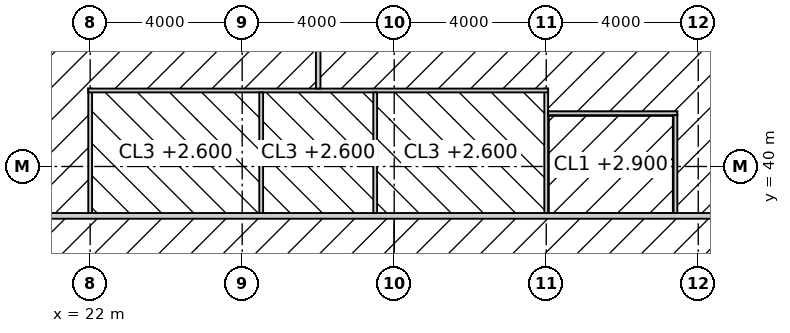
"""IFC4 building model, lengths in metres.
Left out: names, types, materials, properties, quantities, classifications, styles, units other than length and angle.
Written with IfcOpenShell. Run it as: python <this file> out.ifc"""

import sys

from ifc_helpers import new_model, si_unit, direction, frame, frame_2d, origin, place, context, subcontext, project, spatial, rectangle, extrude, element, fill, save


model = new_model("IFC4")
c1 = context("Model", 3, precision=1e-05, world=origin(), true_north=direction((0.0, 1.0)))
c2 = subcontext(c1, "Body", "Model", "MODEL_VIEW")
j1 = project(units=[si_unit("LENGTHUNIT", "METRE"), si_unit("PLANEANGLEUNIT", "RADIAN")], contexts=[c1])
p1 = place(None, origin())
s1 = spatial("IfcSite", under=j1, at=p1, CompositionType="ELEMENT")
p2 = place(p1, origin())
s2 = spatial("IfcBuilding", under=s1, at=p2, CompositionType="ELEMENT")
p3 = place(p2, frame((0.0, 0.0, 19.0)))
s3 = spatial("IfcBuildingStorey", under=s2, at=p3, CompositionType="ELEMENT", Elevation=19.0)
p4 = place(p3, frame((15.775, 38.7, 0.0), z_axis=(0.0, 0.0, 1.0), x_axis=(1.0, 0.0, 0.0)))
e1 = element("IfcWall", 1, at=p4, inside=s3, PredefinedType="PARTITIONING", context=c2, shape_type="SweptSolid", body=[
    extrude(rectangle(XDim=28.45, YDim=0.15, at=frame_2d((14.225, 0.0))), origin(), (0.0, 0.0, 1.0), 3.85),
])
p5 = place(p4, frame((7.975, 0.0, 0.0)))
e2 = element("IfcOpeningElement", 2, at=p5, cuts=e1, PredefinedType="OPENING", context=c2, shape_type="SweptSolid", body=[
    extrude(rectangle(XDim=0.9, YDim=2.1, at=frame_2d((0.45, 1.05))), frame((0.0, 0.085, 0.0), z_axis=(0.0, -1.0, 0.0), x_axis=(1.0, 0.0, 0.0)), (0.0, 0.0, 1.0), 0.17),
])
p6 = place(p4, frame((11.725, 0.0, 0.0)))
e3 = element("IfcOpeningElement", 3, at=p6, cuts=e1, PredefinedType="OPENING", context=c2, shape_type="SweptSolid", body=[
    extrude(rectangle(XDim=1.0, YDim=2.1, at=frame_2d((0.5, 1.05))), frame((0.0, 0.085, 0.0), z_axis=(0.0, -1.0, 0.0), x_axis=(1.0, 0.0, 0.0)), (0.0, 0.0, 1.0), 0.17),
])
p7 = place(p4, frame((15.575, 0.0, 0.0)))
e4 = element("IfcOpeningElement", 4, at=p7, cuts=e1, PredefinedType="OPENING", context=c2, shape_type="SweptSolid", body=[
    extrude(rectangle(XDim=0.9, YDim=2.1, at=frame_2d((0.45, 1.05))), frame((0.0, 0.085, 0.0), z_axis=(0.0, -1.0, 0.0), x_axis=(1.0, 0.0, 0.0)), (0.0, 0.0, 1.0), 0.17),
])
for number, where, z_axis, x_axis in (
    (5, (22.0, 38.775, 0.0), (0.0, 0.0, 1.0), (0.0, 1.0, 0.0)),
    (6, (34.0, 38.775, 0.0), (0.0, 0.0, 1.0), (0.0, 1.0, 0.0)),
):
    element("IfcWall", number, at=place(p3, frame(where, z_axis=z_axis, x_axis=x_axis)), inside=s3, PredefinedType="PARTITIONING", context=c2, shape_type="SweptSolid", body=[
        extrude(rectangle(XDim=3.275, YDim=0.1, at=frame_2d((1.638, 0.0))), origin(), (0.0, 0.0, 1.0), 2.95),
    ])
p8 = place(p3, frame((21.95, 42.0, 0.0), z_axis=(0.0, 0.0, 1.0), x_axis=(1.0, 0.0, 0.0)))
e7 = element("IfcWall", 7, at=p8, inside=s3, PredefinedType="PARTITIONING", context=c2, shape_type="SweptSolid", body=[
    extrude(rectangle(XDim=12.1, YDim=0.1, at=frame_2d((6.05, 0.0))), origin(), (0.0, 0.0, 1.0), 3.85),
])
for number, where, z_axis, x_axis in (
    (8, (26.5, 38.775, 0.0), (0.0, 0.0, 1.0), (0.0, 1.0, 0.0)),
    (9, (29.5, 38.775, 0.0), (0.0, 0.0, 1.0), (0.0, 1.0, 0.0)),
):
    element("IfcWall", number, at=place(p3, frame(where, z_axis=z_axis, x_axis=x_axis)), inside=s3, PredefinedType="PARTITIONING", context=c2, shape_type="SweptSolid", body=[
        extrude(rectangle(XDim=3.175, YDim=0.1, at=frame_2d((1.587, 0.0))), origin(), (0.0, 0.0, 1.0), 3.85),
    ])
p9 = place(p3, frame((28.0, 42.05, 0.0), z_axis=(0.0, 0.0, 1.0), x_axis=(0.0, 1.0, 0.0)))
e10 = element("IfcWall", 10, at=p9, inside=s3, PredefinedType="PARTITIONING", context=c2, shape_type="SweptSolid", body=[
    extrude(rectangle(XDim=1.65, YDim=0.12, at=frame_2d((0.825, 0.0))), origin(), (0.0, 0.0, 1.0), 3.85),
])
p10 = place(p3, frame((34.05, 41.4, 0.0), z_axis=(0.0, 0.0, 1.0), x_axis=(1.0, 0.0, 0.0)))
e11 = element("IfcWall", 11, at=p10, inside=s3, PredefinedType="PARTITIONING", context=c2, shape_type="SweptSolid", body=[
    extrude(rectangle(XDim=3.4, YDim=0.1, at=frame_2d((1.7, 0.0))), origin(), (0.0, 0.0, 1.0), 3.85),
])
p11 = place(p10, frame((1.15, 0.0, 0.0)))
e12 = element("IfcOpeningElement", 12, at=p11, cuts=e11, PredefinedType="OPENING", context=c2, shape_type="SweptSolid", body=[
    extrude(rectangle(XDim=1.0, YDim=2.2, at=frame_2d((0.5, 1.1))), frame((0.0, 0.06, 0.0), z_axis=(0.0, -1.0, 0.0), x_axis=(1.0, 0.0, 0.0)), (0.0, 0.0, 1.0), 0.12),
])
p12 = place(p3, frame((37.4, 38.775, 0.0), z_axis=(0.0, 0.0, 1.0), x_axis=(0.0, 1.0, 0.0)))
e13 = element("IfcWall", 13, at=p12, inside=s3, PredefinedType="PARTITIONING", context=c2, shape_type="SweptSolid", body=[
    extrude(rectangle(XDim=2.575, YDim=0.1, at=frame_2d((1.288, 0.0))), origin(), (0.0, 0.0, 1.0), 3.85),
])
p13 = place(p5, origin())
e14 = element("IfcDoor", 14, at=p13, inside=s3, OperationType="SINGLE_SWING_LEFT", PredefinedType="DOOR", context=c2, shape_type="SweptSolid", body=[
    extrude(rectangle(XDim=0.9, YDim=2.1, at=frame_2d((0.45, 1.05))), frame((0.0, 0.025, 0.0), z_axis=(0.0, -1.0, 0.0), x_axis=(1.0, 0.0, 0.0)), (0.0, 0.0, 1.0), 0.05),
])
fill(e2, e14)
p14 = place(p6, origin())
e15 = element("IfcDoor", 15, at=p14, inside=s3, OperationType="SLIDING_TO_LEFT", PredefinedType="DOOR", context=c2, shape_type="SweptSolid", body=[
    extrude(rectangle(XDim=1.0, YDim=2.1, at=frame_2d((0.5, 1.05))), frame((0.0, 0.025, 0.0), z_axis=(0.0, -1.0, 0.0), x_axis=(1.0, 0.0, 0.0)), (0.0, 0.0, 1.0), 0.05),
])
fill(e3, e15)
p15 = place(p7, origin())
e16 = element("IfcDoor", 16, at=p15, inside=s3, OperationType="SINGLE_SWING_LEFT", PredefinedType="DOOR", context=c2, shape_type="SweptSolid", body=[
    extrude(rectangle(XDim=0.9, YDim=2.1, at=frame_2d((0.45, 1.05))), frame((0.0, 0.025, 0.0), z_axis=(0.0, -1.0, 0.0), x_axis=(1.0, 0.0, 0.0)), (0.0, 0.0, 1.0), 0.05),
])
fill(e4, e16)
p16 = place(p11, origin())
e17 = element("IfcDoor", 17, at=p16, inside=s3, OperationType="SINGLE_SWING_LEFT", PredefinedType="DOOR", context=c2, shape_type="SweptSolid", body=[
    extrude(rectangle(XDim=1.0, YDim=2.2, at=frame_2d((0.5, 1.1))), frame((0.0, 0.025, 0.0), z_axis=(0.0, -1.0, 0.0), x_axis=(1.0, 0.0, 0.0)), (0.0, 0.0, 1.0), 0.05),
])
fill(e12, e17)
save(model, sys.argv[1])
